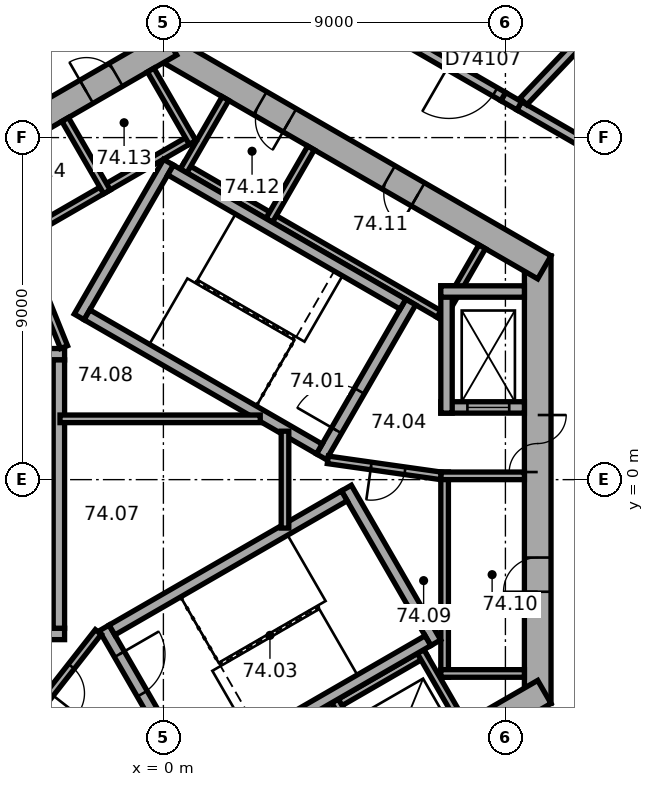
"""IFC4 building model, lengths in metres.
Left out: names, types, materials, properties, quantities, classifications, styles, units other than length and angle.
Written with IfcOpenShell. Run it as: python <this file> out.ifc"""

import sys

from ifc_helpers import new_model, si_unit, direction, frame, frame_2d, origin, place, context, subcontext, project, spatial, rectangle, extrude, element, fill, save


model = new_model("IFC4")
c1 = context("Model", 3, precision=1e-05, world=origin(), true_north=direction((0.0, 1.0)))
c2 = subcontext(c1, "Body", "Model", "MODEL_VIEW")
j1 = project(units=[si_unit("LENGTHUNIT", "METRE"), si_unit("PLANEANGLEUNIT", "RADIAN")], contexts=[c1])
p1 = place(None, origin())
s1 = spatial("IfcSite", under=j1, at=p1, CompositionType="ELEMENT")
p2 = place(p1, origin())
s2 = spatial("IfcBuilding", under=s1, at=p2, CompositionType="ELEMENT")
p3 = place(p2, frame((0.0, 0.0, 300.5)))
s3 = spatial("IfcBuildingStorey", under=s2, at=p3, CompositionType="ELEMENT", Elevation=300.5)
p4 = place(p3, frame((9.85, -5.889, 0.0), z_axis=(0.0, 0.0, 1.0), x_axis=(0.0, 1.0, 0.0)))
e1 = element("IfcWall", 1, at=p4, inside=s3, PredefinedType="SHEAR", context=c2, shape_type="SweptSolid", body=[
    extrude(rectangle(XDim=11.778, YDim=0.7, at=frame_2d((5.889, 0.0))), origin(), (0.0, 0.0, 1.0), 4.5),
])
p5 = place(p4, frame((6.089, 0.0, 0.0)))
e2 = element("IfcOpeningElement", 2, at=p5, cuts=e1, PredefinedType="OPENING", context=c2, shape_type="SweptSolid", body=[
    extrude(rectangle(XDim=1.5, YDim=2.1, at=frame_2d((0.75, 1.05))), frame((0.0, 0.36, 0.0), z_axis=(0.0, -1.0, 0.0), x_axis=(1.0, 0.0, 0.0)), (0.0, 0.0, 1.0), 0.72),
])
p6 = place(p4, frame((2.939, 0.0, 0.0)))
e3 = element("IfcOpeningElement", 3, at=p6, cuts=e1, PredefinedType="OPENING", context=c2, shape_type="SweptSolid", body=[
    extrude(rectangle(XDim=0.9, YDim=2.1, at=frame_2d((0.45, 1.05))), frame((0.0, 0.36, 0.0), z_axis=(0.0, -1.0, 0.0), x_axis=(1.0, 0.0, 0.0)), (0.0, 0.0, 1.0), 0.72),
])
p7 = place(p3, frame((10.025, 5.586, 0.0), z_axis=(0.0, 0.0, 1.0), x_axis=(-0.866026453023, 0.499998182661, 0.0)))
e4 = element("IfcWall", 4, at=p7, inside=s3, PredefinedType="SHEAR", context=c2, shape_type="SweptSolid", body=[
    extrude(rectangle(XDim=11.778, YDim=0.7, at=frame_2d((5.889, 0.0))), origin(), (0.0, 0.0, 1.0), 4.5),
])
p8 = place(p7, frame((3.839, 0.0, 0.0)))
e5 = element("IfcOpeningElement", 5, at=p8, cuts=e4, PredefinedType="OPENING", context=c2, shape_type="SweptSolid", body=[
    extrude(rectangle(XDim=0.9, YDim=2.1, at=frame_2d((0.45, 1.05))), frame((0.0, 0.36, 0.0), z_axis=(0.0, -1.0, 0.0), x_axis=(1.0, 0.0, 0.0)), (0.0, 0.0, 1.0), 0.72),
])
p9 = place(p7, frame((7.739, 0.0, 0.0)))
e6 = element("IfcOpeningElement", 6, at=p9, cuts=e4, PredefinedType="OPENING", context=c2, shape_type="SweptSolid", body=[
    extrude(rectangle(XDim=0.9, YDim=2.1, at=frame_2d((0.45, 1.05))), frame((0.0, 0.36, 0.0), z_axis=(0.0, -1.0, 0.0), x_axis=(1.0, 0.0, 0.0)), (0.0, 0.0, 1.0), 0.72),
])
p10 = place(p3, frame((0.175, 11.475, 0.0), z_axis=(0.0, 0.0, 1.0), x_axis=(-0.866026453023, -0.499998182661, 0.0)))
e7 = element("IfcWall", 7, at=p10, inside=s3, PredefinedType="SHEAR", context=c2, shape_type="SweptSolid", body=[
    extrude(rectangle(XDim=11.778, YDim=0.7, at=frame_2d((5.889, 0.0))), origin(), (0.0, 0.0, 1.0), 4.5),
])
p11 = place(p10, frame((6.089, 0.0, 0.0)))
e8 = element("IfcOpeningElement", 8, at=p11, cuts=e7, PredefinedType="OPENING", context=c2, shape_type="SweptSolid", body=[
    extrude(rectangle(XDim=1.5, YDim=2.1, at=frame_2d((0.75, 1.05))), frame((0.0, 0.36, 0.0), z_axis=(0.0, -1.0, 0.0), x_axis=(1.0, 0.0, 0.0)), (0.0, 0.0, 1.0), 0.72),
])
p12 = place(p10, frame((1.639, 0.0, 0.0)))
e9 = element("IfcOpeningElement", 9, at=p12, cuts=e7, PredefinedType="OPENING", context=c2, shape_type="SweptSolid", body=[
    extrude(rectangle(XDim=0.9, YDim=2.1, at=frame_2d((0.45, 1.05))), frame((0.0, 0.36, 0.0), z_axis=(0.0, -1.0, 0.0), x_axis=(1.0, 0.0, 0.0)), (0.0, 0.0, 1.0), 0.72),
])
p13 = place(p10, frame((4.239, 0.0, 0.0)))
e10 = element("IfcOpeningElement", 10, at=p13, cuts=e7, PredefinedType="OPENING", context=c2, shape_type="SweptSolid", body=[
    extrude(rectangle(XDim=0.9, YDim=2.1, at=frame_2d((0.45, 1.05))), frame((0.0, 0.36, 0.0), z_axis=(0.0, -1.0, 0.0), x_axis=(1.0, 0.0, 0.0)), (0.0, 0.0, 1.0), 0.72),
])
p14 = place(p3, frame((-10.025, -5.586, 0.0), z_axis=(0.0, 0.0, 1.0), x_axis=(0.866026453023, -0.499998182661, 0.0)))
e11 = element("IfcWall", 11, at=p14, inside=s3, PredefinedType="SHEAR", context=c2, shape_type="SweptSolid", body=[
    extrude(rectangle(XDim=11.778, YDim=0.7, at=frame_2d((5.889, 0.0))), origin(), (0.0, 0.0, 1.0), 4.5),
])
p15 = place(p14, frame((6.089, 0.0, 0.0)))
e12 = element("IfcOpeningElement", 12, at=p15, cuts=e11, PredefinedType="OPENING", context=c2, shape_type="SweptSolid", body=[
    extrude(rectangle(XDim=1.5, YDim=2.1, at=frame_2d((0.75, 1.05))), frame((0.0, 0.36, 0.0), z_axis=(0.0, -1.0, 0.0), x_axis=(1.0, 0.0, 0.0)), (0.0, 0.0, 1.0), 0.72),
])
p16 = place(p3, frame((-0.175, -11.475, 0.0), z_axis=(0.0, 0.0, 1.0), x_axis=(0.866026453023, 0.499998182661, 0.0)))
e13 = element("IfcWall", 13, at=p16, inside=s3, PredefinedType="SHEAR", context=c2, shape_type="SweptSolid", body=[
    extrude(rectangle(XDim=11.778, YDim=0.7, at=frame_2d((5.889, 0.0))), origin(), (0.0, 0.0, 1.0), 4.5),
])
p17 = place(p16, frame((7.639, 0.0, 0.0)))
e14 = element("IfcOpeningElement", 14, at=p17, cuts=e13, PredefinedType="OPENING", context=c2, shape_type="SweptSolid", body=[
    extrude(rectangle(XDim=1.1, YDim=2.1, at=frame_2d((0.55, 1.05))), frame((0.0, 0.36, 0.0), z_axis=(0.0, -1.0, 0.0), x_axis=(1.0, 0.0, 0.0)), (0.0, 0.0, 1.0), 0.72),
])
p18 = place(p3, frame((7.4, -5.2, 0.0), z_axis=(0.0, 0.0, 1.0), x_axis=(0.0, 1.0, 0.0)))
e15 = element("IfcWall", 15, at=p18, inside=s3, PredefinedType="PARTITIONING", context=c2, shape_type="SweptSolid", body=[
    extrude(rectangle(XDim=5.4, YDim=0.2, at=frame_2d((2.7, 0.0))), origin(), (0.0, 0.0, 1.0), 4.2),
])
for number, where, z_axis, x_axis in (
    (16, (7.3, -5.1, 0.0), (0.0, 0.0, 1.0), (1.0, 0.0, 0.0)),
    (17, (7.3, 0.1, 0.0), (0.0, 0.0, 1.0), (1.0, 0.0, 0.0)),
):
    element("IfcWall", number, at=place(p3, frame(where, z_axis=z_axis, x_axis=x_axis)), inside=s3, PredefinedType="PARTITIONING", context=c2, shape_type="SweptSolid", body=[
        extrude(rectangle(XDim=2.2, YDim=0.2, at=frame_2d((1.1, 0.0))), origin(), (0.0, 0.0, 1.0), 4.2),
    ])
p19 = place(p3, frame((7.424, 4.259, 0.0), z_axis=(0.0, 0.0, 1.0), x_axis=(-0.866026010844, 0.49999894854, 0.0)))
e18 = element("IfcWall", 18, at=p19, inside=s3, PredefinedType="PARTITIONING", context=c2, shape_type="SweptSolid", body=[
    extrude(rectangle(XDim=8.0, YDim=0.2, at=frame_2d((4.0, 0.0))), origin(), (0.0, 0.0, 1.0), 4.2),
])
for number, where, z_axis, x_axis in (
    (19, (7.287, 4.222, 0.0), (0.0, 0.0, 1.0), (0.5, 0.866, 0.0)),
    (20, (2.784, 6.822, 0.0), (0.0, 0.0, 1.0), (0.5, 0.866, 0.0)),
    (21, (0.532, 8.122, 0.0), (0.0, 0.0, 1.0), (0.5, 0.866, 0.0)),
):
    element("IfcWall", number, at=place(p3, frame(where, z_axis=z_axis, x_axis=x_axis)), inside=s3, PredefinedType="PARTITIONING", context=c2, shape_type="SweptSolid", body=[
        extrude(rectangle(XDim=2.2, YDim=0.2, at=frame_2d((1.1, 0.0))), origin(), (0.0, 0.0, 1.0), 4.2),
    ])
p20 = place(p3, frame((0.803, 9.009, 0.0), z_axis=(0.0, 0.0, 1.0), x_axis=(-0.866028230842, -0.499995103361, 0.0)))
e22 = element("IfcWall", 22, at=p20, inside=s3, PredefinedType="PARTITIONING", context=c2, shape_type="SweptSolid", body=[
    extrude(rectangle(XDim=5.4, YDim=0.2, at=frame_2d((2.7, 0.0))), origin(), (0.0, 0.0, 1.0), 4.2),
])
p21 = place(p3, frame((0.767, 8.872, 0.0), z_axis=(0.0, 0.0, 1.0), x_axis=(-0.499994660107, 0.866028486751, 0.0)))
e23 = element("IfcWall", 23, at=p21, inside=s3, PredefinedType="PARTITIONING", context=c2, shape_type="SweptSolid", body=[
    extrude(rectangle(XDim=2.2, YDim=0.2, at=frame_2d((1.1, 0.0))), origin(), (0.0, 0.0, 1.0), 4.2),
])
p22 = place(p3, frame((-1.485, 7.572, 0.0), z_axis=(0.0, 0.0, 1.0), x_axis=(-0.50002983664, 0.866008176907, 0.0)))
e24 = element("IfcWall", 24, at=p22, inside=s3, PredefinedType="PARTITIONING", context=c2, shape_type="SweptSolid", body=[
    extrude(rectangle(XDim=2.2, YDim=0.2, at=frame_2d((1.1, 0.0))), origin(), (0.0, 0.0, 1.0), 4.2),
])
p23 = place(p3, frame((-0.024, -8.559, 0.0), z_axis=(0.0, 0.0, 1.0), x_axis=(0.866026010844, 0.49999894854, 0.0)))
e25 = element("IfcWall", 25, at=p23, inside=s3, PredefinedType="PARTITIONING", context=c2, shape_type="SweptSolid", body=[
    extrude(rectangle(XDim=8.0, YDim=0.2, at=frame_2d((4.0, 0.0))), origin(), (0.0, 0.0, 1.0), 4.2),
])
for number, where, z_axis, x_axis in (
    (26, (4.516, -5.822, 0.0), (0.0, 0.0, 1.0), (0.5, -0.866, 0.0)),
    (27, (6.768, -4.522, 0.0), (0.0, 0.0, 1.0), (0.5, -0.866, 0.0)),
):
    element("IfcWall", number, at=place(p3, frame(where, z_axis=z_axis, x_axis=x_axis)), inside=s3, PredefinedType="PARTITIONING", context=c2, shape_type="SweptSolid", body=[
        extrude(rectangle(XDim=2.2, YDim=0.2, at=frame_2d((1.1, 0.0))), origin(), (0.0, 0.0, 1.0), 4.2),
    ])
p24 = place(p3, frame((4.158, 0.602, 0.0), z_axis=(0.0, 0.0, 1.0), x_axis=(0.499977259774, 0.866038532462, 0.0)))
e28 = element("IfcWall", 28, at=p24, inside=s3, PredefinedType="SHEAR", context=c2, shape_type="SweptSolid", body=[
    extrude(rectangle(XDim=4.7, YDim=0.3, at=frame_2d((2.35, 0.0))), origin(), (0.0, 0.0, 1.0), 4.5),
])
p25 = place(p24, frame((0.8, 0.0, 0.0)))
e29 = element("IfcOpeningElement", 29, at=p25, cuts=e28, PredefinedType="OPENING", context=c2, shape_type="SweptSolid", body=[
    extrude(rectangle(XDim=1.2, YDim=2.1, at=frame_2d((0.6, 1.05))), frame((0.0, 0.16, 0.0), z_axis=(0.0, -1.0, 0.0), x_axis=(1.0, 0.0, 0.0)), (0.0, 0.0, 1.0), 0.32),
])
p26 = place(p3, frame((-2.216, 4.282, 0.0), z_axis=(0.0, 0.0, 1.0), x_axis=(0.499977259774, 0.866038532462, 0.0)))
e30 = element("IfcWall", 30, at=p26, inside=s3, PredefinedType="SHEAR", context=c2, shape_type="SweptSolid", body=[
    extrude(rectangle(XDim=4.7, YDim=0.3, at=frame_2d((2.35, 0.0))), origin(), (0.0, 0.0, 1.0), 4.5),
])
for number, where, z_axis, x_axis in (
    (31, (4.103, 0.807, 0.0), (0.0, 0.0, 1.0), (-0.866, 0.5, 0.0)),
    (32, (6.303, 4.617, 0.0), (0.0, 0.0, 1.0), (-0.866, 0.5, 0.0)),
):
    element("IfcWall", number, at=place(p3, frame(where, z_axis=z_axis, x_axis=x_axis)), inside=s3, PredefinedType="SHEAR", context=c2, shape_type="SweptSolid", body=[
        extrude(rectangle(XDim=7.06, YDim=0.3, at=frame_2d((3.53, 0.0))), origin(), (0.0, 0.0, 1.0), 4.5),
    ])
p27 = place(p3, frame((-2.6, 3.3, 0.0), z_axis=(0.0, 0.0, 1.0), x_axis=(-1.0, 0.0, 0.0)))
e33 = element("IfcWall", 33, at=p27, inside=s3, PredefinedType="SHEAR", context=c2, shape_type="SweptSolid", body=[
    extrude(rectangle(XDim=4.7, YDim=0.3, at=frame_2d((2.35, 0.0))), origin(), (0.0, 0.0, 1.0), 4.5),
])
p28 = place(p27, frame((0.8, 0.0, 0.0)))
e34 = element("IfcOpeningElement", 34, at=p28, cuts=e33, PredefinedType="OPENING", context=c2, shape_type="SweptSolid", body=[
    extrude(rectangle(XDim=1.2, YDim=2.1, at=frame_2d((0.6, 1.05))), frame((0.0, 0.16, 0.0), z_axis=(0.0, -1.0, 0.0), x_axis=(1.0, 0.0, 0.0)), (0.0, 0.0, 1.0), 0.32),
])
p29 = place(p3, frame((-2.6, -4.06, 0.0), z_axis=(0.0, 0.0, 1.0), x_axis=(-1.0, 0.0, 0.0)))
e35 = element("IfcWall", 35, at=p29, inside=s3, PredefinedType="SHEAR", context=c2, shape_type="SweptSolid", body=[
    extrude(rectangle(XDim=4.7, YDim=0.3, at=frame_2d((2.35, 0.0))), origin(), (0.0, 0.0, 1.0), 4.5),
])
p30 = place(p3, frame((-2.75, 3.15, 0.0), z_axis=(0.0, 0.0, 1.0), x_axis=(0.0, -1.0, 0.0)))
e36 = element("IfcWall", 36, at=p30, inside=s3, PredefinedType="SHEAR", context=c2, shape_type="SweptSolid", body=[
    extrude(rectangle(XDim=7.06, YDim=0.3, at=frame_2d((3.53, 0.0))), origin(), (0.0, 0.0, 1.0), 4.5),
])
p31 = place(p3, frame((-1.558, -3.902, 0.0), z_axis=(0.0, 0.0, 1.0), x_axis=(0.499977259774, -0.866038532462, 0.0)))
e37 = element("IfcWall", 37, at=p31, inside=s3, PredefinedType="SHEAR", context=c2, shape_type="SweptSolid", body=[
    extrude(rectangle(XDim=4.7, YDim=0.3, at=frame_2d((2.35, 0.0))), origin(), (0.0, 0.0, 1.0), 4.5),
])
p32 = place(p31, frame((0.8, 0.0, 0.0)))
e38 = element("IfcOpeningElement", 38, at=p32, cuts=e37, PredefinedType="OPENING", context=c2, shape_type="SweptSolid", body=[
    extrude(rectangle(XDim=1.2, YDim=2.1, at=frame_2d((0.6, 1.05))), frame((0.0, 0.16, 0.0), z_axis=(0.0, -1.0, 0.0), x_axis=(1.0, 0.0, 0.0)), (0.0, 0.0, 1.0), 0.32),
])
p33 = place(p3, frame((4.816, -0.222, 0.0), z_axis=(0.0, 0.0, 1.0), x_axis=(0.499977259774, -0.866038532462, 0.0)))
e39 = element("IfcWall", 39, at=p33, inside=s3, PredefinedType="SHEAR", context=c2, shape_type="SweptSolid", body=[
    extrude(rectangle(XDim=4.7, YDim=0.3, at=frame_2d((2.35, 0.0))), origin(), (0.0, 0.0, 1.0), 4.5),
])
for number, where, z_axis, x_axis in (
    (40, (-1.353, -3.957, 0.0), (0.0, 0.0, 1.0), (0.866, 0.5, 0.0)),
    (41, (0.847, -7.767, 0.0), (0.0, 0.0, 1.0), (0.866, 0.5, 0.0)),
):
    element("IfcWall", number, at=place(p3, frame(where, z_axis=z_axis, x_axis=x_axis)), inside=s3, PredefinedType="SHEAR", context=c2, shape_type="SweptSolid", body=[
        extrude(rectangle(XDim=7.06, YDim=0.3, at=frame_2d((3.53, 0.0))), origin(), (0.0, 0.0, 1.0), 4.5),
    ])
p34 = place(p3, frame((7.3, 1.9, 0.0), z_axis=(0.0, 0.0, 1.0), x_axis=(1.0, 0.0, 0.0)))
e42 = element("IfcWall", 42, at=p34, inside=s3, PredefinedType="SHEAR", context=c2, shape_type="SweptSolid", body=[
    extrude(rectangle(XDim=2.2, YDim=0.3, at=frame_2d((1.1, 0.0))), origin(), (0.0, 0.0, 1.0), 4.2),
])
p35 = place(p34, frame((0.7, 0.0, 0.0)))
e43 = element("IfcOpeningElement", 43, at=p35, cuts=e42, PredefinedType="OPENING", context=c2, shape_type="SweptSolid", body=[
    extrude(rectangle(XDim=1.1, YDim=2.1, at=frame_2d((0.55, 1.05))), frame((0.0, 0.16, 0.0), z_axis=(0.0, -1.0, 0.0), x_axis=(1.0, 0.0, 0.0)), (0.0, 0.0, 1.0), 0.32),
])
p36 = place(p3, frame((7.45, 1.75, 0.0), z_axis=(0.0, 0.0, 1.0), x_axis=(0.0, 1.0, 0.0)))
e44 = element("IfcWall", 44, at=p36, inside=s3, PredefinedType="SHEAR", context=c2, shape_type="SweptSolid", body=[
    extrude(rectangle(XDim=3.35, YDim=0.3, at=frame_2d((1.675, 0.0))), origin(), (0.0, 0.0, 1.0), 4.2),
])
p37 = place(p3, frame((7.3, 4.95, 0.0), z_axis=(0.0, 0.0, 1.0), x_axis=(1.0, 0.0, 0.0)))
e45 = element("IfcWall", 45, at=p37, inside=s3, PredefinedType="SHEAR", context=c2, shape_type="SweptSolid", body=[
    extrude(rectangle(XDim=2.2, YDim=0.3, at=frame_2d((1.1, 0.0))), origin(), (0.0, 0.0, 1.0), 4.2),
])
p38 = place(p3, frame((4.327, 0.521, 0.0), z_axis=(0.0, 0.0, 1.0), x_axis=(0.990124376366, -0.14019172346, 0.0)))
e46 = element("IfcWall", 46, at=p38, inside=s3, PredefinedType="PARTITIONING", context=c2, shape_type="SweptSolid", body=[
    extrude(rectangle(XDim=3.002, YDim=0.2, at=frame_2d((1.501, 0.0))), origin(), (0.0, 0.0, 1.0), 4.2),
])
p39 = place(p38, frame((1.15, 0.0, 0.0)))
e47 = element("IfcOpeningElement", 47, at=p39, cuts=e46, PredefinedType="OPENING", context=c2, shape_type="SweptSolid", body=[
    extrude(rectangle(XDim=0.9, YDim=2.1, at=frame_2d((0.45, 1.05))), frame((0.0, 0.11, 0.0), z_axis=(0.0, -1.0, 0.0), x_axis=(1.0, 0.0, 0.0)), (0.0, 0.0, 1.0), 0.22),
])
p40 = place(p3, frame((-2.615, 3.487, 0.0), z_axis=(0.0, 0.0, 1.0), x_axis=(-0.373576831041, 0.92759924068, 0.0)))
e48 = element("IfcWall", 48, at=p40, inside=s3, PredefinedType="PARTITIONING", context=c2, shape_type="SweptSolid", body=[
    extrude(rectangle(XDim=3.002, YDim=0.2, at=frame_2d((1.501, 0.0))), origin(), (0.0, 0.0, 1.0), 4.2),
])
p41 = place(p40, frame((1.15, 0.0, 0.0)))
e49 = element("IfcOpeningElement", 49, at=p41, cuts=e48, PredefinedType="OPENING", context=c2, shape_type="SweptSolid", body=[
    extrude(rectangle(XDim=0.9, YDim=2.1, at=frame_2d((0.45, 1.05))), frame((0.0, 0.11, 0.0), z_axis=(0.0, -1.0, 0.0), x_axis=(1.0, 0.0, 0.0)), (0.0, 0.0, 1.0), 0.22),
])
p42 = place(p3, frame((-1.712, -4.008, 0.0), z_axis=(0.0, 0.0, 1.0), x_axis=(-0.616549420702, -0.787316208287, 0.0)))
e50 = element("IfcWall", 50, at=p42, inside=s3, PredefinedType="PARTITIONING", context=c2, shape_type="SweptSolid", body=[
    extrude(rectangle(XDim=3.002, YDim=0.2, at=frame_2d((1.501, 0.0))), origin(), (0.0, 0.0, 1.0), 4.2),
])
p43 = place(p42, frame((1.15, 0.0, 0.0)))
e51 = element("IfcOpeningElement", 51, at=p43, cuts=e50, PredefinedType="OPENING", context=c2, shape_type="SweptSolid", body=[
    extrude(rectangle(XDim=0.9, YDim=2.1, at=frame_2d((0.45, 1.05))), frame((0.0, 0.11, 0.0), z_axis=(0.0, -1.0, 0.0), x_axis=(1.0, 0.0, 0.0)), (0.0, 0.0, 1.0), 0.22),
])
p44 = place(p3, frame((-2.72, 1.6, 0.0), z_axis=(0.0, 0.0, 1.0), x_axis=(1.0, 0.0, 0.0)))
e52 = element("IfcWall", 52, at=p44, inside=s3, PredefinedType="PARTITIONING", context=c2, shape_type="SweptSolid", body=[
    extrude(rectangle(XDim=5.269, YDim=0.2, at=frame_2d((2.634, 0.0))), origin(), (0.0, 0.0, 1.0), 4.2),
])
p45 = place(p3, frame((3.2, -1.275, 0.0), z_axis=(0.0, 0.0, 1.0), x_axis=(0.0, 1.0, 0.0)))
e53 = element("IfcWall", 53, at=p45, inside=s3, PredefinedType="PARTITIONING", context=c2, shape_type="SweptSolid", body=[
    extrude(rectangle(XDim=2.549, YDim=0.2, at=frame_2d((1.275, 0.0))), origin(), (0.0, 0.0, 1.0), 4.2),
])
p46 = place(p3, frame((13.2, 7.621, 0.0), z_axis=(0.0, 0.0, 1.0), x_axis=(-0.866036909293, 0.499980071345, 0.0)))
e54 = element("IfcWall", 54, at=p46, inside=s3, PredefinedType="SOLIDWALL", context=c2, shape_type="SweptSolid", body=[
    extrude(rectangle(XDim=4.43, YDim=0.25, at=frame_2d((2.215, 0.0))), origin(), (0.0, 0.0, 1.0), 4.2),
])
p47 = place(p3, frame((8.943, 10.079, 0.0), z_axis=(0.0, 0.0, 1.0), x_axis=(0.865976326759, -0.500084994269, 0.0)))
e55 = element("IfcWall", 55, at=p47, inside=s3, PredefinedType="SOLIDWALL", context=c2, shape_type="SweptSolid", body=[
    extrude(rectangle(XDim=0.486, YDim=0.25, at=frame_2d((0.243, 0.0))), origin(), (0.0, 0.0, 1.0), 4.2),
])
p48 = place(p3, frame((3.952, 12.96, 0.0), z_axis=(0.0, 0.0, 1.0), x_axis=(0.866036720167, -0.499980398938, 0.0)))
e56 = element("IfcWall", 56, at=p48, inside=s3, PredefinedType="SOLIDWALL", context=c2, shape_type="SweptSolid", body=[
    extrude(rectangle(XDim=5.762, YDim=0.25, at=frame_2d((2.881, 0.0))), origin(), (0.0, 0.0, 1.0), 4.2),
])
p49 = place(p48, frame((4.112, 0.0, 0.0)))
e57 = element("IfcOpeningElement", 57, at=p49, cuts=e56, PredefinedType="OPENING", context=c2, shape_type="SweptSolid", body=[
    extrude(rectangle(XDim=1.4, YDim=2.1, at=frame_2d((0.7, 1.05))), frame((0.0, 0.135, 0.0), z_axis=(0.0, -1.0, 0.0), x_axis=(1.0, 0.0, 0.0)), (0.0, 0.0, 1.0), 0.27),
])
p50 = place(p3, frame((12.626, 13.264, 0.0), z_axis=(0.0, 0.0, 1.0), x_axis=(-0.689459162518, -0.724324556549, 0.0)))
e58 = element("IfcWall", 58, at=p50, inside=s3, PredefinedType="SOLIDWALL", context=c2, shape_type="SweptSolid", body=[
    extrude(rectangle(XDim=4.573, YDim=0.25, at=frame_2d((2.286, 0.0))), origin(), (0.0, 0.0, 1.0), 4.2),
])
p51 = place(p5, origin())
e59 = element("IfcDoor", 59, at=p51, inside=s3, OperationType="DOUBLE_DOOR_SINGLE_SWING", PredefinedType="DOOR", context=c2, shape_type="SweptSolid", body=[
    extrude(rectangle(XDim=1.5, YDim=2.1, at=frame_2d((0.75, 1.05))), frame((0.0, 0.025, 0.0), z_axis=(0.0, -1.0, 0.0), x_axis=(1.0, 0.0, 0.0)), (0.0, 0.0, 1.0), 0.05),
])
fill(e2, e59)
p52 = place(p25, origin())
e60 = element("IfcDoor", 60, at=p52, inside=s3, OperationType="SINGLE_SWING_RIGHT", PredefinedType="DOOR", context=c2, shape_type="SweptSolid", body=[
    extrude(rectangle(XDim=1.2, YDim=2.1, at=frame_2d((0.6, 1.05))), frame((0.0, 0.025, 0.0), z_axis=(0.0, -1.0, 0.0), x_axis=(1.0, 0.0, 0.0)), (0.0, 0.0, 1.0), 0.05),
])
fill(e29, e60)
p53 = place(p32, origin())
e61 = element("IfcDoor", 61, at=p53, inside=s3, OperationType="SINGLE_SWING_RIGHT", PredefinedType="DOOR", context=c2, shape_type="SweptSolid", body=[
    extrude(rectangle(XDim=1.2, YDim=2.1, at=frame_2d((0.6, 1.05))), frame((0.0, 0.025, 0.0), z_axis=(0.0, -1.0, 0.0), x_axis=(1.0, 0.0, 0.0)), (0.0, 0.0, 1.0), 0.05),
])
fill(e38, e61)
p54 = place(p39, origin())
e62 = element("IfcDoor", 62, at=p54, inside=s3, OperationType="SINGLE_SWING_LEFT", PredefinedType="DOOR", context=c2, shape_type="SweptSolid", body=[
    extrude(rectangle(XDim=0.9, YDim=2.1, at=frame_2d((0.45, 1.05))), frame((0.0, 0.025, 0.0), z_axis=(0.0, -1.0, 0.0), x_axis=(1.0, 0.0, 0.0)), (0.0, 0.0, 1.0), 0.05),
])
fill(e47, e62)
p55 = place(p43, origin())
e63 = element("IfcDoor", 63, at=p55, inside=s3, OperationType="SINGLE_SWING_LEFT", PredefinedType="DOOR", context=c2, shape_type="SweptSolid", body=[
    extrude(rectangle(XDim=0.9, YDim=2.1, at=frame_2d((0.45, 1.05))), frame((0.0, 0.025, 0.0), z_axis=(0.0, -1.0, 0.0), x_axis=(1.0, 0.0, 0.0)), (0.0, 0.0, 1.0), 0.05),
])
fill(e51, e63)
p56 = place(p6, origin())
e64 = element("IfcDoor", 64, at=p56, inside=s3, OperationType="SINGLE_SWING_LEFT", PredefinedType="DOOR", context=c2, shape_type="SweptSolid", body=[
    extrude(rectangle(XDim=0.9, YDim=2.1, at=frame_2d((0.45, 1.05))), frame((0.0, 0.025, 0.0), z_axis=(0.0, -1.0, 0.0), x_axis=(1.0, 0.0, 0.0)), (0.0, 0.0, 1.0), 0.05),
])
fill(e3, e64)
p57 = place(p8, origin())
e65 = element("IfcDoor", 65, at=p57, inside=s3, OperationType="SINGLE_SWING_LEFT", PredefinedType="DOOR", context=c2, shape_type="SweptSolid", body=[
    extrude(rectangle(XDim=0.9, YDim=2.1, at=frame_2d((0.45, 1.05))), frame((0.0, 0.025, 0.0), z_axis=(0.0, -1.0, 0.0), x_axis=(1.0, 0.0, 0.0)), (0.0, 0.0, 1.0), 0.05),
])
fill(e5, e65)
p58 = place(p9, origin())
e66 = element("IfcDoor", 66, at=p58, inside=s3, OperationType="SINGLE_SWING_LEFT", PredefinedType="DOOR", context=c2, shape_type="SweptSolid", body=[
    extrude(rectangle(XDim=0.9, YDim=2.1, at=frame_2d((0.45, 1.05))), frame((0.0, 0.025, 0.0), z_axis=(0.0, -1.0, 0.0), x_axis=(1.0, 0.0, 0.0)), (0.0, 0.0, 1.0), 0.05),
])
fill(e6, e66)
p59 = place(p12, origin())
e67 = element("IfcDoor", 67, at=p59, inside=s3, OperationType="SINGLE_SWING_LEFT", PredefinedType="DOOR", context=c2, shape_type="SweptSolid", body=[
    extrude(rectangle(XDim=0.9, YDim=2.1, at=frame_2d((0.45, 1.05))), frame((0.0, 0.025, 0.0), z_axis=(0.0, -1.0, 0.0), x_axis=(1.0, 0.0, 0.0)), (0.0, 0.0, 1.0), 0.05),
])
fill(e9, e67)
p60 = place(p35, origin())
e68 = element("IfcDoor", 68, at=p60, inside=s3, OperationType="DOUBLE_DOOR_SLIDING", PredefinedType="DOOR", context=c2, shape_type="SweptSolid", body=[
    extrude(rectangle(XDim=1.1, YDim=2.1, at=frame_2d((0.55, 1.05))), frame((0.0, 0.025, 0.0), z_axis=(0.0, -1.0, 0.0), x_axis=(1.0, 0.0, 0.0)), (0.0, 0.0, 1.0), 0.05),
])
fill(e43, e68)
p61 = place(p49, origin())
e69 = element("IfcDoor", 69, at=p61, inside=s3, OperationType="SINGLE_SWING_LEFT", PredefinedType="DOOR", context=c2, shape_type="SweptSolid", body=[
    extrude(rectangle(XDim=1.4, YDim=2.1, at=frame_2d((0.7, 1.05))), frame((0.0, 0.025, 0.0), z_axis=(0.0, -1.0, 0.0), x_axis=(1.0, 0.0, 0.0)), (0.0, 0.0, 1.0), 0.05),
])
fill(e57, e69)
save(model, sys.argv[1])
